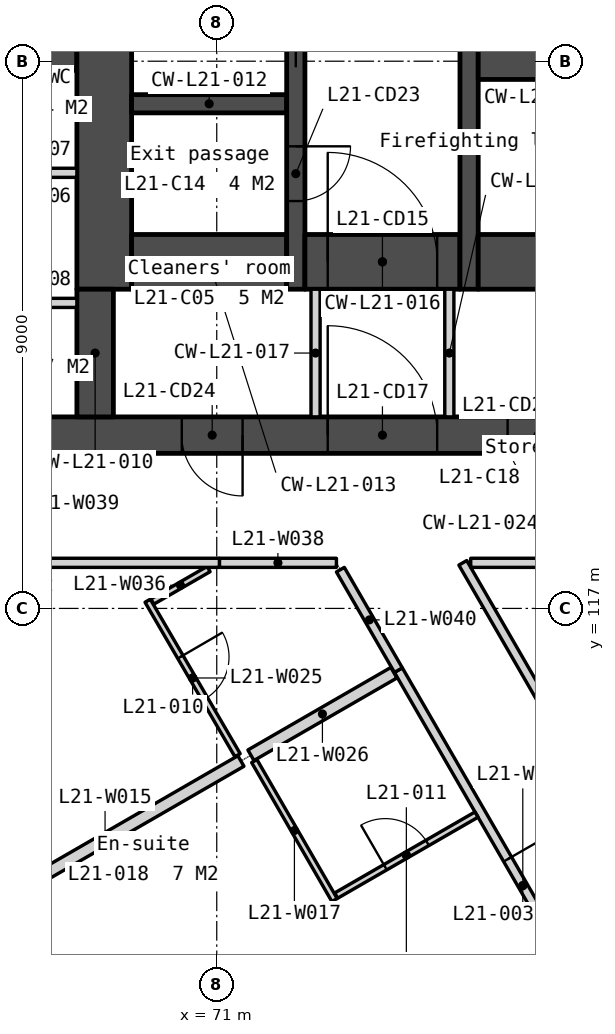
"""IFC4 building model, lengths in metres.
Left out: names, types, materials, properties, quantities, classifications, styles, units other than length and angle.
Written with IfcOpenShell. Run it as: python <this file> out.ifc"""

import sys

from ifc_helpers import new_model, si_unit, direction, frame, frame_2d, origin, place, context, subcontext, project, spatial, polyline, rectangle, outline, extrude, element, fill, save


model = new_model("IFC4")
c1 = context("Model", 3, precision=1e-05, world=origin(), true_north=direction((0.0, 1.0)))
c2 = subcontext(c1, "Body", "Model", "MODEL_VIEW")
j1 = project(units=[si_unit("LENGTHUNIT", "METRE"), si_unit("PLANEANGLEUNIT", "RADIAN")], contexts=[c1])
p1 = place(None, origin())
s1 = spatial("IfcSite", under=j1, at=p1, CompositionType="ELEMENT")
p2 = place(p1, origin())
s2 = spatial("IfcBuilding", under=s1, at=p2, CompositionType="ELEMENT")
p3 = place(p2, frame((0.0, 0.0, 88.8)))
s3 = spatial("IfcBuildingStorey", under=s2, at=p3, CompositionType="ELEMENT", Elevation=88.8)
p4 = place(p3, frame((66.0, 119.85, 0.0), z_axis=(0.0, 0.0, 1.0), x_axis=(1.0, 0.0, 0.0)))
e1 = element("IfcWall", 1, at=p4, inside=s3, PredefinedType="SOLIDWALL", context=c2, shape_type="SweptSolid", body=[
    extrude(rectangle(XDim=28.0, YDim=0.6, at=frame_2d((14.0, 0.0))), origin(), (0.0, 0.0, 1.0), 3.35),
])
p5 = place(p4, frame((6.825, 0.0, 0.0)))
e2 = element("IfcOpeningElement", 2, at=p5, cuts=e1, PredefinedType="OPENING", context=c2, shape_type="SweptSolid", body=[
    extrude(rectangle(XDim=1.8, YDim=2.1, at=frame_2d((0.9, 1.05))), frame((0.0, 0.31, 0.0), z_axis=(0.0, -1.0, 0.0), x_axis=(1.0, 0.0, 0.0)), (0.0, 0.0, 1.0), 0.62),
])
p6 = place(p4, frame((15.85, 0.0, 0.0)))
e3 = element("IfcOpeningElement", 3, at=p6, cuts=e1, PredefinedType="OPENING", context=c2, shape_type="SweptSolid", body=[
    extrude(rectangle(XDim=1.5, YDim=2.1, at=frame_2d((0.75, 1.05))), frame((0.0, 0.31, 0.0), z_axis=(0.0, -1.0, 0.0), x_axis=(1.0, 0.0, 0.0)), (0.0, 0.0, 1.0), 0.62),
])
p7 = place(p4, frame((19.375, 0.0, 0.0)))
e4 = element("IfcOpeningElement", 4, at=p7, cuts=e1, PredefinedType="OPENING", context=c2, shape_type="SweptSolid", body=[
    extrude(rectangle(XDim=1.8, YDim=2.1, at=frame_2d((0.9, 1.05))), frame((0.0, 0.31, 0.0), z_axis=(0.0, -1.0, 0.0), x_axis=(1.0, 0.0, 0.0)), (0.0, 0.0, 1.0), 0.62),
])
p8 = place(p4, frame((4.425, 0.0, 0.0)))
e5 = element("IfcOpeningElement", 5, at=p8, cuts=e1, PredefinedType="OPENING", context=c2, shape_type="SweptSolid", body=[
    extrude(rectangle(XDim=1.0, YDim=2.1, at=frame_2d((0.5, 1.05))), frame((0.0, 0.31, 0.0), z_axis=(0.0, -1.0, 0.0), x_axis=(1.0, 0.0, 0.0)), (0.0, 0.0, 1.0), 0.62),
])
p9 = place(p4, frame((9.783, 0.0, 0.0)))
e6 = element("IfcOpeningElement", 6, at=p9, cuts=e1, PredefinedType="OPENING", context=c2, shape_type="SweptSolid", body=[
    extrude(rectangle(XDim=1.0, YDim=2.1, at=frame_2d((0.5, 1.05))), frame((0.0, 0.31, 0.0), z_axis=(0.0, -1.0, 0.0), x_axis=(1.0, 0.0, 0.0)), (0.0, 0.0, 1.0), 0.62),
])
p10 = place(p4, frame((11.525, 0.0, 0.0)))
e7 = element("IfcOpeningElement", 7, at=p10, cuts=e1, PredefinedType="OPENING", context=c2, shape_type="SweptSolid", body=[
    extrude(rectangle(XDim=1.0, YDim=2.1, at=frame_2d((0.5, 1.05))), frame((0.0, 0.31, 0.0), z_axis=(0.0, -1.0, 0.0), x_axis=(1.0, 0.0, 0.0)), (0.0, 0.0, 1.0), 0.62),
])
p11 = place(p4, frame((13.658, 0.0, 0.0)))
e8 = element("IfcOpeningElement", 8, at=p11, cuts=e1, PredefinedType="OPENING", context=c2, shape_type="SweptSolid", body=[
    extrude(rectangle(XDim=1.0, YDim=2.1, at=frame_2d((0.5, 1.05))), frame((0.0, 0.31, 0.0), z_axis=(0.0, -1.0, 0.0), x_axis=(1.0, 0.0, 0.0)), (0.0, 0.0, 1.0), 0.62),
])
p12 = place(p4, frame((21.725, 0.0, 0.0)))
e9 = element("IfcOpeningElement", 9, at=p12, cuts=e1, PredefinedType="OPENING", context=c2, shape_type="SweptSolid", body=[
    extrude(rectangle(XDim=1.0, YDim=2.1, at=frame_2d((0.5, 1.05))), frame((0.0, 0.31, 0.0), z_axis=(0.0, -1.0, 0.0), x_axis=(1.0, 0.0, 0.0)), (0.0, 0.0, 1.0), 0.62),
])
p13 = place(p4, frame((23.425, 0.0, 0.0)))
e10 = element("IfcOpeningElement", 10, at=p13, cuts=e1, PredefinedType="OPENING", context=c2, shape_type="SweptSolid", body=[
    extrude(rectangle(XDim=1.0, YDim=2.1, at=frame_2d((0.5, 1.05))), frame((0.0, 0.31, 0.0), z_axis=(0.0, -1.0, 0.0), x_axis=(1.0, 0.0, 0.0)), (0.0, 0.0, 1.0), 0.62),
])
p14 = place(p3, frame((66.6, 126.15, 0.0), z_axis=(0.0, 0.0, 1.0), x_axis=(1.0, 0.0, 0.0)))
e11 = element("IfcWall", 11, at=p14, inside=s3, PredefinedType="SOLIDWALL", context=c2, shape_type="SweptSolid", body=[
    extrude(rectangle(XDim=2.1, YDim=0.6, at=frame_2d((1.05, 0.0))), origin(), (0.0, 0.0, 1.0), 3.35),
])
for number, where, z_axis, x_axis in (
    (12, (66.6, 124.165, 0.0), (0.0, 0.0, 1.0), (1.0, 0.0, 0.0)),
    (13, (66.6, 122.025, 0.0), (0.0, 0.0, 1.0), (1.0, 0.0, 0.0)),
):
    element("IfcWall", number, at=place(p3, frame(where, z_axis=z_axis, x_axis=x_axis)), inside=s3, PredefinedType="PARTITIONING", context=c2, shape_type="SweptSolid", body=[
        extrude(rectangle(XDim=2.1, YDim=0.15, at=frame_2d((1.05, 0.0))), origin(), (0.0, 0.0, 1.0), 3.35),
    ])
p15 = place(p3, frame((69.15, 133.95, 0.0), z_axis=(0.0, 0.0, 1.0), x_axis=(0.0, -1.0, 0.0)))
e14 = element("IfcWall", 14, at=p15, inside=s3, PredefinedType="SOLIDWALL", context=c2, shape_type="SweptSolid", body=[
    extrude(rectangle(XDim=11.7, YDim=0.9, at=frame_2d((5.85, 0.0))), origin(), (0.0, 0.0, 1.0), 3.35),
])
p16 = place(p3, frame((69.0, 122.25, 0.0), z_axis=(0.0, 0.0, 1.0), x_axis=(0.0, -1.0, 0.0)))
e15 = element("IfcWall", 15, at=p16, inside=s3, PredefinedType="SOLIDWALL", context=c2, shape_type="SweptSolid", body=[
    extrude(rectangle(XDim=2.1, YDim=0.6, at=frame_2d((1.05, 0.0))), origin(), (0.0, 0.0, 1.0), 3.35),
])
p17 = place(p3, frame((69.6, 125.3, 0.0), z_axis=(0.0, 0.0, 1.0), x_axis=(1.0, 0.0, 0.0)))
e16 = element("IfcWall", 16, at=p17, inside=s3, PredefinedType="SOLIDWALL", context=c2, shape_type="SweptSolid", body=[
    extrude(rectangle(XDim=2.55, YDim=0.3, at=frame_2d((1.275, 0.0))), origin(), (0.0, 0.0, 1.0), 3.35),
])
p18 = place(p3, frame((69.6, 122.7, 0.0), z_axis=(0.0, 0.0, 1.0), x_axis=(1.0, 0.0, 0.0)))
e17 = element("IfcWall", 17, at=p18, inside=s3, PredefinedType="SOLIDWALL", context=c2, shape_type="SweptSolid", body=[
    extrude(rectangle(XDim=2.55, YDim=0.9, at=frame_2d((1.275, 0.0))), origin(), (0.0, 0.0, 1.0), 3.35),
])
p19 = place(p3, frame((72.3, 133.95, 0.0), z_axis=(0.0, 0.0, 1.0), x_axis=(0.0, -1.0, 0.0)))
e18 = element("IfcWall", 18, at=p19, inside=s3, PredefinedType="SOLIDWALL", context=c2, shape_type="SweptSolid", body=[
    extrude(rectangle(XDim=11.7, YDim=0.3, at=frame_2d((5.85, 0.0))), origin(), (0.0, 0.0, 1.0), 3.35),
])
p20 = place(p19, frame((6.95, 0.0, 0.0)))
e19 = element("IfcOpeningElement", 19, at=p20, cuts=e18, PredefinedType="OPENING", context=c2, shape_type="SweptSolid", body=[
    extrude(rectangle(XDim=1.1, YDim=2.1, at=frame_2d((0.55, 1.05))), frame((0.0, 0.16, 0.0), z_axis=(0.0, -1.0, 0.0), x_axis=(1.0, 0.0, 0.0)), (0.0, 0.0, 1.0), 0.32),
])
p21 = place(p19, frame((9.35, 0.0, 0.0)))
e20 = element("IfcOpeningElement", 20, at=p21, cuts=e18, PredefinedType="OPENING", context=c2, shape_type="SweptSolid", body=[
    extrude(rectangle(XDim=0.9, YDim=2.1, at=frame_2d((0.45, 1.05))), frame((0.0, 0.16, 0.0), z_axis=(0.0, -1.0, 0.0), x_axis=(1.0, 0.0, 0.0)), (0.0, 0.0, 1.0), 0.32),
])
p22 = place(p19, frame((5.1, 0.0, 0.0)))
e21 = element("IfcOpeningElement", 21, at=p22, cuts=e18, PredefinedType="OPENING", context=c2, shape_type="SweptSolid", body=[
    extrude(rectangle(XDim=1.0, YDim=2.1, at=frame_2d((0.5, 1.05))), frame((0.0, 0.16, 0.0), z_axis=(0.0, -1.0, 0.0), x_axis=(1.0, 0.0, 0.0)), (0.0, 0.0, 1.0), 0.32),
])
p23 = place(p3, frame((72.45, 122.7, 0.0), z_axis=(0.0, 0.0, 1.0), x_axis=(1.0, 0.0, 0.0)))
e22 = element("IfcWall", 22, at=p23, inside=s3, PredefinedType="SOLIDWALL", context=c2, shape_type="SweptSolid", body=[
    extrude(rectangle(XDim=2.55, YDim=0.9, at=frame_2d((1.275, 0.0))), origin(), (0.0, 0.0, 1.0), 3.35),
])
p24 = place(p23, frame((0.375, 0.0, 0.0)))
e23 = element("IfcOpeningElement", 23, at=p24, cuts=e22, PredefinedType="OPENING", context=c2, shape_type="SweptSolid", body=[
    extrude(rectangle(XDim=1.8, YDim=2.1, at=frame_2d((0.9, 1.05))), frame((0.0, 0.46, 0.0), z_axis=(0.0, -1.0, 0.0), x_axis=(1.0, 0.0, 0.0)), (0.0, 0.0, 1.0), 0.92),
])
for number, where, z_axis, x_axis in (
    (24, (72.625, 122.25, 0.0), (0.0, 0.0, 1.0), (0.0, -1.0, 0.0)),
    (25, (74.825, 122.25, 0.0), (0.0, 0.0, 1.0), (0.0, -1.0, 0.0)),
):
    element("IfcWall", number, at=place(p3, frame(where, z_axis=z_axis, x_axis=x_axis)), inside=s3, PredefinedType="PARTITIONING", context=c2, shape_type="SweptSolid", body=[
        extrude(rectangle(XDim=2.1, YDim=0.15, at=frame_2d((1.05, 0.0))), origin(), (0.0, 0.0, 1.0), 3.35),
    ])
p25 = place(p3, frame((75.15, 133.95, 0.0), z_axis=(0.0, 0.0, 1.0), x_axis=(0.0, -1.0, 0.0)))
e26 = element("IfcWall", 26, at=p25, inside=s3, PredefinedType="SOLIDWALL", context=c2, shape_type="SweptSolid", body=[
    extrude(rectangle(XDim=11.7, YDim=0.3, at=frame_2d((5.85, 0.0))), origin(), (0.0, 0.0, 1.0), 3.35),
])
p26 = place(p3, frame((75.3, 126.075, 0.0), z_axis=(0.0, 0.0, 1.0), x_axis=(1.0, 0.0, 0.0)))
e27 = element("IfcWall", 27, at=p26, inside=s3, PredefinedType="SOLIDWALL", context=c2, shape_type="SweptSolid", body=[
    extrude(rectangle(XDim=2.1, YDim=0.75, at=frame_2d((1.05, 0.0))), origin(), (0.0, 0.0, 1.0), 3.35),
])
p27 = place(p3, frame((75.3, 122.7, 0.0), z_axis=(0.0, 0.0, 1.0), x_axis=(1.0, 0.0, 0.0)))
e28 = element("IfcWall", 28, at=p27, inside=s3, PredefinedType="SOLIDWALL", context=c2, shape_type="SweptSolid", body=[
    extrude(rectangle(XDim=6.2, YDim=0.9, at=frame_2d((3.1, 0.0))), origin(), (0.0, 0.0, 1.0), 3.35),
])
p28 = place(p3, frame((56.073, 130.263, -0.15), z_axis=(0.0, 0.0, 1.0), x_axis=(0.500000478905, -0.866025127289, 0.0)))
e29 = element("IfcWall", 29, at=p28, inside=s3, PredefinedType="SOLIDWALL", context=c2, shape_type="SweptSolid", body=[
    extrude(outline(polyline([(42.643, 0.0), (42.643, 3.5), (0.0, 3.5), (0.0, 0.0), (42.643, 0.0)])), frame((0.0, 0.225, 0.0), z_axis=(0.0, -1.0, 0.0), x_axis=(1.0, 0.0, 0.0)), (0.0, 0.0, 1.0), 0.45),
])
p29 = place(p28, frame((0.72, 0.0, 1.05)))
e30 = element("IfcOpeningElement", 30, at=p29, cuts=e29, PredefinedType="OPENING", context=c2, shape_type="SweptSolid", body=[
    extrude(rectangle(XDim=1.2, YDim=1.5, at=frame_2d((0.6, 0.75))), frame((0.0, 0.235, 0.0), z_axis=(0.0, -1.0, 0.0), x_axis=(1.0, 0.0, 0.0)), (0.0, 0.0, 1.0), 0.47),
])
p30 = place(p28, frame((7.079, 0.0, 1.05)))
e31 = element("IfcOpeningElement", 31, at=p30, cuts=e29, PredefinedType="OPENING", context=c2, shape_type="SweptSolid", body=[
    extrude(rectangle(XDim=1.2, YDim=1.5, at=frame_2d((0.6, 0.75))), frame((0.0, 0.235, 0.0), z_axis=(0.0, -1.0, 0.0), x_axis=(1.0, 0.0, 0.0)), (0.0, 0.0, 1.0), 0.47),
])
p31 = place(p28, frame((8.779, 0.0, 1.05)))
e32 = element("IfcOpeningElement", 32, at=p31, cuts=e29, PredefinedType="OPENING", context=c2, shape_type="SweptSolid", body=[
    extrude(rectangle(XDim=1.2, YDim=1.5, at=frame_2d((0.6, 0.75))), frame((0.0, 0.235, 0.0), z_axis=(0.0, -1.0, 0.0), x_axis=(1.0, 0.0, 0.0)), (0.0, 0.0, 1.0), 0.47),
])
p32 = place(p28, frame((15.607, 0.0, 1.05)))
e33 = element("IfcOpeningElement", 33, at=p32, cuts=e29, PredefinedType="OPENING", context=c2, shape_type="SweptSolid", body=[
    extrude(rectangle(XDim=1.2, YDim=1.5, at=frame_2d((0.6, 0.75))), frame((0.0, 0.235, 0.0), z_axis=(0.0, -1.0, 0.0), x_axis=(1.0, 0.0, 0.0)), (0.0, 0.0, 1.0), 0.47),
])
p33 = place(p28, frame((17.307, 0.0, 1.05)))
e34 = element("IfcOpeningElement", 34, at=p33, cuts=e29, PredefinedType="OPENING", context=c2, shape_type="SweptSolid", body=[
    extrude(rectangle(XDim=1.2, YDim=1.5, at=frame_2d((0.6, 0.75))), frame((0.0, 0.235, 0.0), z_axis=(0.0, -1.0, 0.0), x_axis=(1.0, 0.0, 0.0)), (0.0, 0.0, 1.0), 0.47),
])
p34 = place(p28, frame((24.136, 0.0, 1.05)))
e35 = element("IfcOpeningElement", 35, at=p34, cuts=e29, PredefinedType="OPENING", context=c2, shape_type="SweptSolid", body=[
    extrude(rectangle(XDim=1.2, YDim=1.5, at=frame_2d((0.6, 0.75))), frame((0.0, 0.235, 0.0), z_axis=(0.0, -1.0, 0.0), x_axis=(1.0, 0.0, 0.0)), (0.0, 0.0, 1.0), 0.47),
])
p35 = place(p28, frame((25.836, 0.0, 1.05)))
e36 = element("IfcOpeningElement", 36, at=p35, cuts=e29, PredefinedType="OPENING", context=c2, shape_type="SweptSolid", body=[
    extrude(rectangle(XDim=1.2, YDim=1.5, at=frame_2d((0.6, 0.75))), frame((0.0, 0.235, 0.0), z_axis=(0.0, -1.0, 0.0), x_axis=(1.0, 0.0, 0.0)), (0.0, 0.0, 1.0), 0.47),
])
p36 = place(p28, frame((32.665, 0.0, 1.05)))
e37 = element("IfcOpeningElement", 37, at=p36, cuts=e29, PredefinedType="OPENING", context=c2, shape_type="SweptSolid", body=[
    extrude(rectangle(XDim=1.2, YDim=1.5, at=frame_2d((0.6, 0.75))), frame((0.0, 0.235, 0.0), z_axis=(0.0, -1.0, 0.0), x_axis=(1.0, 0.0, 0.0)), (0.0, 0.0, 1.0), 0.47),
])
p37 = place(p28, frame((34.365, 0.0, 1.05)))
e38 = element("IfcOpeningElement", 38, at=p37, cuts=e29, PredefinedType="OPENING", context=c2, shape_type="SweptSolid", body=[
    extrude(rectangle(XDim=1.2, YDim=1.5, at=frame_2d((0.6, 0.75))), frame((0.0, 0.235, 0.0), z_axis=(0.0, -1.0, 0.0), x_axis=(1.0, 0.0, 0.0)), (0.0, 0.0, 1.0), 0.47),
])
p38 = place(p28, frame((40.722, 0.0, 1.05)))
e39 = element("IfcOpeningElement", 39, at=p38, cuts=e29, PredefinedType="OPENING", context=c2, shape_type="SweptSolid", body=[
    extrude(rectangle(XDim=1.2, YDim=1.5, at=frame_2d((0.6, 0.75))), frame((0.0, 0.235, 0.0), z_axis=(0.0, -1.0, 0.0), x_axis=(1.0, 0.0, 0.0)), (0.0, 0.0, 1.0), 0.47),
])
p39 = place(p3, frame((73.987, 115.985, 0.0), z_axis=(0.0, 0.0, 1.0), x_axis=(0.499995293736, -0.86602812093, 0.0)))
e40 = element("IfcWall", 40, at=p39, inside=s3, PredefinedType="PARTITIONING", context=c2, shape_type="SweptSolid", body=[
    extrude(rectangle(XDim=8.185, YDim=0.15, at=frame_2d((4.092, 0.0))), origin(), (0.0, 0.0, 1.0), 3.35),
])
p40 = place(p39, frame((3.592, 0.0, 0.0)))
e41 = element("IfcOpeningElement", 41, at=p40, cuts=e40, PredefinedType="OPENING", context=c2, shape_type="SweptSolid", body=[
    extrude(rectangle(XDim=1.0, YDim=2.1, at=frame_2d((0.5, 1.05))), frame((0.0, 0.085, 0.0), z_axis=(0.0, -1.0, 0.0), x_axis=(1.0, 0.0, 0.0)), (0.0, 0.0, 1.0), 0.17),
])
p41 = place(p3, frame((66.929, 111.91, 0.0), z_axis=(0.0, 0.0, 1.0), x_axis=(0.866021702275, 0.500006411147, 0.0)))
e42 = element("IfcWall", 42, at=p41, inside=s3, PredefinedType="PARTITIONING", context=c2, shape_type="SweptSolid", body=[
    extrude(rectangle(XDim=5.16, YDim=0.2, at=frame_2d((2.58, 0.0))), origin(), (0.0, 0.0, 1.0), 3.35),
])
p42 = place(p3, frame((71.617, 114.49, 0.0), z_axis=(0.0, 0.0, 1.0), x_axis=(0.500007957085, -0.86602080971, 0.0)))
e43 = element("IfcWall", 43, at=p42, inside=s3, PredefinedType="PARTITIONING", context=c2, shape_type="SweptSolid", body=[
    extrude(rectangle(XDim=2.64, YDim=0.1, at=frame_2d((1.32, 0.0))), origin(), (0.0, 0.0, 1.0), 3.35),
])
p43 = place(p3, frame((72.964, 112.277, 0.0), z_axis=(0.0, 0.0, 1.0), x_axis=(0.866075755805, 0.4999127776, 0.0)))
e44 = element("IfcWall", 44, at=p43, inside=s3, PredefinedType="PARTITIONING", context=c2, shape_type="SweptSolid", body=[
    extrude(rectangle(XDim=2.665, YDim=0.1, at=frame_2d((1.333, 0.0))), origin(), (0.0, 0.0, 1.0), 3.35),
])
p44 = place(p43, frame((0.933, 0.0, 0.0)))
e45 = element("IfcOpeningElement", 45, at=p44, cuts=e44, PredefinedType="OPENING", context=c2, shape_type="SweptSolid", body=[
    extrude(rectangle(XDim=0.8, YDim=2.1, at=frame_2d((0.4, 1.05))), frame((0.0, 0.06, 0.0), z_axis=(0.0, -1.0, 0.0), x_axis=(1.0, 0.0, 0.0)), (0.0, 0.0, 1.0), 0.12),
])
p45 = place(p3, frame((69.864, 117.126, 0.0), z_axis=(0.0, 0.0, 1.0), x_axis=(0.502920651267, -0.864332585599, 0.0)))
e46 = element("IfcWall", 46, at=p45, inside=s3, PredefinedType="PARTITIONING", context=c2, shape_type="SweptSolid", body=[
    extrude(rectangle(XDim=2.94, YDim=0.1, at=frame_2d((1.47, 0.0))), origin(), (0.0, 0.0, 1.0), 3.35),
])
p46 = place(p45, frame((1.07, 0.0, 0.0)))
e47 = element("IfcOpeningElement", 47, at=p46, cuts=e46, PredefinedType="OPENING", context=c2, shape_type="SweptSolid", body=[
    extrude(rectangle(XDim=0.8, YDim=2.1, at=frame_2d((0.4, 1.05))), frame((0.0, 0.06, 0.0), z_axis=(0.0, -1.0, 0.0), x_axis=(1.0, 0.0, 0.0)), (0.0, 0.0, 1.0), 0.12),
])
p47 = place(p3, frame((71.562, 114.585, 0.0), z_axis=(0.0, 0.0, 1.0), x_axis=(0.866020851292, 0.500007885066, 0.0)))
e48 = element("IfcWall", 48, at=p47, inside=s3, PredefinedType="PARTITIONING", context=c2, shape_type="SweptSolid", body=[
    extrude(rectangle(XDim=2.715, YDim=0.2, at=frame_2d((1.357, 0.0))), origin(), (0.0, 0.0, 1.0), 3.35),
])
p48 = place(p3, frame((69.941, 117.113, 0.0), z_axis=(0.0, 0.0, 1.0), x_axis=(0.866040989419, 0.499973003918, 0.0)))
e49 = element("IfcWall", 49, at=p48, inside=s3, PredefinedType="PARTITIONING", context=c2, shape_type="SweptSolid", body=[
    extrude(rectangle(XDim=1.068, YDim=0.1, at=frame_2d((0.534, 0.0))), origin(), (0.0, 0.0, 1.0), 3.35),
])
p49 = place(p3, frame((71.044, 117.75, 0.0), z_axis=(0.0, 0.0, 1.0), x_axis=(1.0, 0.0, 0.0)))
e50 = element("IfcWall", 50, at=p49, inside=s3, PredefinedType="PARTITIONING", context=c2, shape_type="SweptSolid", body=[
    extrude(rectangle(XDim=1.925, YDim=0.15, at=frame_2d((0.962, 0.0))), origin(), (0.0, 0.0, 1.0), 3.35),
])
p50 = place(p3, frame((64.275, 117.75, 0.0), z_axis=(0.0, 0.0, 1.0), x_axis=(1.0, 0.0, 0.0)))
e51 = element("IfcWall", 51, at=p50, inside=s3, PredefinedType="PARTITIONING", context=c2, shape_type="SweptSolid", body=[
    extrude(rectangle(XDim=6.769, YDim=0.15, at=frame_2d((3.384, 0.0))), origin(), (0.0, 0.0, 1.0), 3.35),
])
p51 = place(p50, frame((2.884, 0.0, 0.0)))
e52 = element("IfcOpeningElement", 52, at=p51, cuts=e51, PredefinedType="OPENING", context=c2, shape_type="SweptSolid", body=[
    extrude(rectangle(XDim=1.0, YDim=2.1, at=frame_2d((0.5, 1.05))), frame((0.0, 0.085, 0.0), z_axis=(0.0, -1.0, 0.0), x_axis=(1.0, 0.0, 0.0)), (0.0, 0.0, 1.0), 0.17),
])
p52 = place(p3, frame((73.033, 117.637, 0.0), z_axis=(0.0, 0.0, 1.0), x_axis=(0.500006788699, -0.866021484292, 0.0)))
e53 = element("IfcWall", 53, at=p52, inside=s3, PredefinedType="PARTITIONING", context=c2, shape_type="SweptSolid", body=[
    extrude(rectangle(XDim=1.908, YDim=0.15, at=frame_2d((0.954, 0.0))), origin(), (0.0, 0.0, 1.0), 3.35),
])
p53 = place(p3, frame((75.047, 117.75, 0.0), z_axis=(0.0, 0.0, 1.0), x_axis=(0.499995505729, -0.866027998537, 0.0)))
e54 = element("IfcWall", 54, at=p53, inside=s3, PredefinedType="PARTITIONING", context=c2, shape_type="SweptSolid", body=[
    extrude(rectangle(XDim=9.907, YDim=0.15, at=frame_2d((4.953, 0.0))), origin(), (0.0, 0.0, 1.0), 3.35),
])
p54 = place(p53, frame((4.053, 0.0, 0.0)))
e55 = element("IfcOpeningElement", 55, at=p54, cuts=e54, PredefinedType="OPENING", context=c2, shape_type="SweptSolid", body=[
    extrude(rectangle(XDim=1.8, YDim=2.1, at=frame_2d((0.9, 1.05))), frame((0.0, 0.085, 0.0), z_axis=(0.0, -1.0, 0.0), x_axis=(1.0, 0.0, 0.0)), (0.0, 0.0, 1.0), 0.17),
])
p55 = place(p3, frame((75.177, 117.75, 0.0), z_axis=(0.0, 0.0, 1.0), x_axis=(1.0, 0.0, 0.0)))
e56 = element("IfcWall", 56, at=p55, inside=s3, PredefinedType="PARTITIONING", context=c2, shape_type="SweptSolid", body=[
    extrude(rectangle(XDim=9.647, YDim=0.15, at=frame_2d((4.823, 0.0))), origin(), (0.0, 0.0, 1.0), 3.35),
])
p56 = place(p20, origin())
e57 = element("IfcDoor", 57, at=p56, inside=s3, OperationType="SLIDING_TO_LEFT", PredefinedType="DOOR", context=c2, shape_type="SweptSolid", body=[
    extrude(rectangle(XDim=1.1, YDim=2.1, at=frame_2d((0.55, 1.05))), frame((0.0, 0.025, 0.0), z_axis=(0.0, -1.0, 0.0), x_axis=(1.0, 0.0, 0.0)), (0.0, 0.0, 1.0), 0.05),
])
fill(e19, e57)
p57 = place(p24, origin())
e58 = element("IfcDoor", 58, at=p57, inside=s3, OperationType="DOUBLE_DOOR_DOUBLE_SWING", PredefinedType="DOOR", context=c2, shape_type="SweptSolid", body=[
    extrude(rectangle(XDim=1.8, YDim=2.1, at=frame_2d((0.9, 1.05))), frame((0.0, 0.025, 0.0), z_axis=(0.0, -1.0, 0.0), x_axis=(1.0, 0.0, 0.0)), (0.0, 0.0, 1.0), 0.05),
])
fill(e23, e58)
p58 = place(p5, origin())
e59 = element("IfcDoor", 59, at=p58, inside=s3, OperationType="DOUBLE_DOOR_DOUBLE_SWING", PredefinedType="DOOR", context=c2, shape_type="SweptSolid", body=[
    extrude(rectangle(XDim=1.8, YDim=2.1, at=frame_2d((0.9, 1.05))), frame((0.0, 0.025, 0.0), z_axis=(0.0, -1.0, 0.0), x_axis=(1.0, 0.0, 0.0)), (0.0, 0.0, 1.0), 0.05),
])
fill(e2, e59)
p59 = place(p21, origin())
e60 = element("IfcDoor", 60, at=p59, inside=s3, OperationType="SINGLE_SWING_LEFT", PredefinedType="DOOR", context=c2, shape_type="SweptSolid", body=[
    extrude(rectangle(XDim=0.9, YDim=2.1, at=frame_2d((0.45, 1.05))), frame((0.0, 0.025, 0.0), z_axis=(0.0, -1.0, 0.0), x_axis=(1.0, 0.0, 0.0)), (0.0, 0.0, 1.0), 0.05),
])
fill(e20, e60)
p60 = place(p8, origin())
e61 = element("IfcDoor", 61, at=p60, inside=s3, OperationType="SINGLE_SWING_RIGHT", PredefinedType="DOOR", context=c2, shape_type="SweptSolid", body=[
    extrude(rectangle(XDim=1.0, YDim=2.1, at=frame_2d((0.5, 1.05))), frame((0.0, 0.025, 0.0), z_axis=(0.0, -1.0, 0.0), x_axis=(1.0, 0.0, 0.0)), (0.0, 0.0, 1.0), 0.05),
])
fill(e5, e61)
p61 = place(p9, origin())
e62 = element("IfcDoor", 62, at=p61, inside=s3, OperationType="SINGLE_SWING_RIGHT", PredefinedType="DOOR", context=c2, shape_type="SweptSolid", body=[
    extrude(rectangle(XDim=1.0, YDim=2.1, at=frame_2d((0.5, 1.05))), frame((0.0, 0.025, 0.0), z_axis=(0.0, -1.0, 0.0), x_axis=(1.0, 0.0, 0.0)), (0.0, 0.0, 1.0), 0.05),
])
fill(e6, e62)
p62 = place(p40, origin())
e63 = element("IfcDoor", 63, at=p62, inside=s3, OperationType="SINGLE_SWING_LEFT", PredefinedType="DOOR", context=c2, shape_type="SweptSolid", body=[
    extrude(rectangle(XDim=1.0, YDim=2.1, at=frame_2d((0.5, 1.05))), frame((0.0, 0.025, 0.0), z_axis=(0.0, -1.0, 0.0), x_axis=(1.0, 0.0, 0.0)), (0.0, 0.0, 1.0), 0.05),
])
fill(e41, e63)
p63 = place(p46, origin())
e64 = element("IfcDoor", 64, at=p63, inside=s3, OperationType="SINGLE_SWING_LEFT", PredefinedType="DOOR", context=c2, shape_type="SweptSolid", body=[
    extrude(rectangle(XDim=0.8, YDim=2.1, at=frame_2d((0.4, 1.05))), frame((0.0, 0.025, 0.0), z_axis=(0.0, -1.0, 0.0), x_axis=(1.0, 0.0, 0.0)), (0.0, 0.0, 1.0), 0.05),
])
fill(e47, e64)
p64 = place(p44, origin())
e65 = element("IfcDoor", 65, at=p64, inside=s3, OperationType="SINGLE_SWING_LEFT", PredefinedType="DOOR", context=c2, shape_type="SweptSolid", body=[
    extrude(rectangle(XDim=0.8, YDim=2.1, at=frame_2d((0.4, 1.05))), frame((0.0, 0.025, 0.0), z_axis=(0.0, -1.0, 0.0), x_axis=(1.0, 0.0, 0.0)), (0.0, 0.0, 1.0), 0.05),
])
fill(e45, e65)
save(model, sys.argv[1])
